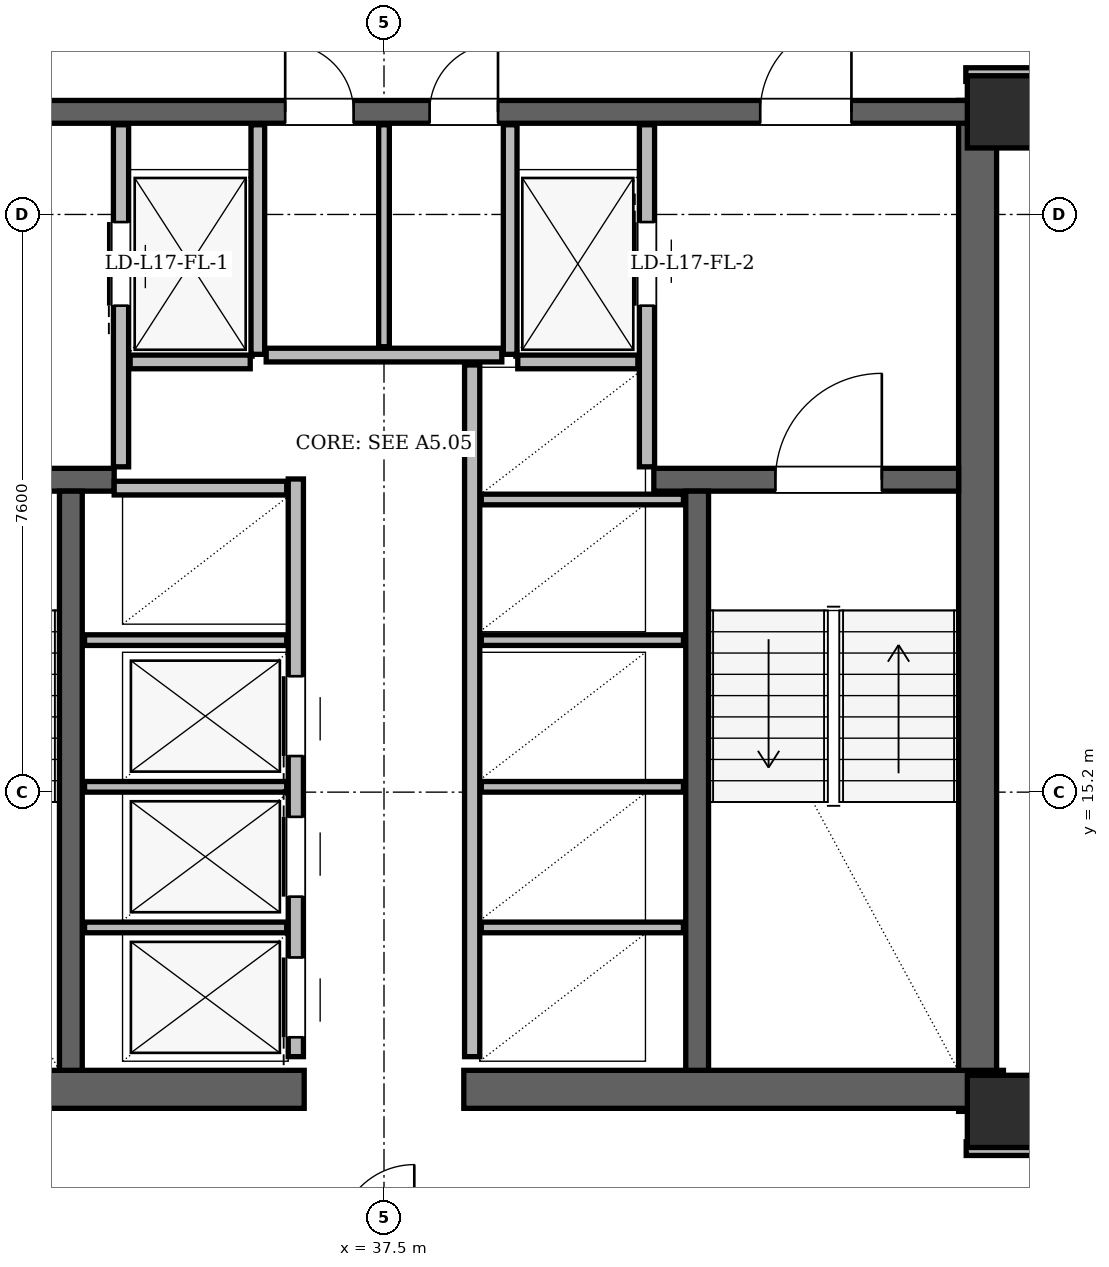
"""IFC4 building model, lengths in metres.
Left out: names, types, materials, properties, quantities, classifications, styles, units other than length and angle.
Written with IfcOpenShell. Run it as: python <this file> out.ifc"""

import sys

from ifc_helpers import new_model, si_unit, direction, frame, frame_2d, origin, origin_2d, place, context, subcontext, project, spatial, rectangle, hollow_rectangle, extrude, element, fill, save


model = new_model("IFC4")
c1 = context("Model", 3, precision=1e-05, world=origin(), true_north=direction((0.0, 1.0)))
c2 = subcontext(c1, "Body", "Model", "MODEL_VIEW")
j1 = project(units=[si_unit("LENGTHUNIT", "METRE"), si_unit("PLANEANGLEUNIT", "RADIAN")], contexts=[c1])
p1 = place(None, origin())
s1 = spatial("IfcSite", under=j1, at=p1, CompositionType="ELEMENT")
p2 = place(p1, origin())
s2 = spatial("IfcBuilding", under=s1, at=p2, CompositionType="ELEMENT")
p3 = place(p2, frame((0.0, 0.0, 66.9)))
s3 = spatial("IfcBuildingStorey", under=s2, at=p3, CompositionType="ELEMENT", Elevation=66.9)
for number, where, z_axis, x_axis in (
    (1, (45.65, 11.0, 0.0), (0.0, 0.0, 1.0), (1.0, 0.0, 0.0)),
    (2, (45.65, 24.15, 0.0), (0.0, 0.0, 1.0), (1.0, 0.0, 0.0)),
):
    element("IfcColumn", number, at=place(p3, frame(where, z_axis=z_axis, x_axis=x_axis)), inside=s3, PredefinedType="COLUMN", context=c2, shape_type="SweptSolid", body=[
        extrude(hollow_rectangle(XDim=0.95, YDim=0.95, WallThickness=0.08, at=origin_2d()), origin(), (0.0, 0.0, 1.0), 3.6),
    ])
p4 = place(p3, frame((45.31, 11.0, 0.0), z_axis=(0.0, 0.0, 1.0), x_axis=(0.0, 1.0, 0.0)))
e3 = element("IfcWall", 3, at=p4, inside=s3, PredefinedType="SHEAR", context=c2, shape_type="SweptSolid", body=[
    extrude(rectangle(XDim=13.3, YDim=0.5, at=frame_2d((6.65, 0.0))), origin(), (0.0, 0.0, 1.0), 3.36),
])
for number, where, z_axis, x_axis in (
    (4, (29.35, 11.29, 0.0), (0.0, 0.0, 1.0), (1.0, 0.0, 0.0)),
    (5, (38.55, 11.29, 0.0), (0.0, 0.0, 1.0), (1.0, 0.0, 0.0)),
):
    element("IfcWall", number, at=place(p3, frame(where, z_axis=z_axis, x_axis=x_axis)), inside=s3, PredefinedType="SHEAR", context=c2, shape_type="SweptSolid", body=[
        extrude(rectangle(XDim=7.1, YDim=0.5, at=frame_2d((3.55, 0.0))), origin(), (0.0, 0.0, 1.0), 3.36),
    ])
p5 = place(p3, frame((29.65, 24.15, 0.0), z_axis=(0.0, 0.0, 1.0), x_axis=(1.0, 0.0, 0.0)))
e6 = element("IfcWall", 6, at=p5, inside=s3, PredefinedType="SHEAR", context=c2, shape_type="SweptSolid", body=[
    extrude(rectangle(XDim=15.7, YDim=0.3, at=frame_2d((7.85, 0.0))), origin(), (0.0, 0.0, 1.0), 3.36),
])
p6 = place(p5, frame((1.7, 0.0, 0.0)))
e7 = element("IfcOpeningElement", 7, at=p6, cuts=e6, PredefinedType="OPENING", context=c2, shape_type="SweptSolid", body=[
    extrude(rectangle(XDim=1.2, YDim=2.2, at=frame_2d((0.6, 1.1))), frame((0.0, 0.15, 0.0), z_axis=(0.0, -1.0, 0.0), x_axis=(1.0, 0.0, 0.0)), (0.0, 0.0, 1.0), 0.3),
])
p7 = place(p5, frame((12.8, 0.0, 0.0)))
e8 = element("IfcOpeningElement", 8, at=p7, cuts=e6, PredefinedType="OPENING", context=c2, shape_type="SweptSolid", body=[
    extrude(rectangle(XDim=1.2, YDim=2.2, at=frame_2d((0.6, 1.1))), frame((0.0, 0.15, 0.0), z_axis=(0.0, -1.0, 0.0), x_axis=(1.0, 0.0, 0.0)), (0.0, 0.0, 1.0), 0.3),
])
p8 = place(p5, frame((6.55, 0.0, 0.0)))
e9 = element("IfcOpeningElement", 9, at=p8, cuts=e6, PredefinedType="OPENING", context=c2, shape_type="SweptSolid", body=[
    extrude(rectangle(XDim=0.9, YDim=2.05, at=frame_2d((0.45, 1.025))), frame((0.0, 0.15, 0.0), z_axis=(0.0, -1.0, 0.0), x_axis=(1.0, 0.0, 0.0)), (0.0, 0.0, 1.0), 0.3),
])
p9 = place(p5, frame((8.45, 0.0, 0.0)))
e10 = element("IfcOpeningElement", 10, at=p9, cuts=e6, PredefinedType="OPENING", context=c2, shape_type="SweptSolid", body=[
    extrude(rectangle(XDim=0.9, YDim=2.05, at=frame_2d((0.45, 1.025))), frame((0.0, 0.15, 0.0), z_axis=(0.0, -1.0, 0.0), x_axis=(1.0, 0.0, 0.0)), (0.0, 0.0, 1.0), 0.3),
])
p10 = place(p3, frame((29.94, 19.31, 0.0), z_axis=(0.0, 0.0, 1.0), x_axis=(1.0, 0.0, 0.0)))
e11 = element("IfcWall", 11, at=p10, inside=s3, PredefinedType="SHEAR", context=c2, shape_type="SweptSolid", body=[
    extrude(rectangle(XDim=4.01, YDim=0.3, at=frame_2d((2.005, 0.0))), origin(), (0.0, 0.0, 1.0), 3.36),
])
p11 = place(p10, frame((1.01, 0.0, 0.0)))
e12 = element("IfcOpeningElement", 12, at=p11, cuts=e11, PredefinedType="OPENING", context=c2, shape_type="SweptSolid", body=[
    extrude(rectangle(XDim=1.4, YDim=2.2, at=frame_2d((0.7, 1.1))), frame((0.0, 0.15, 0.0), z_axis=(0.0, -1.0, 0.0), x_axis=(1.0, 0.0, 0.0)), (0.0, 0.0, 1.0), 0.3),
])
p12 = place(p3, frame((41.05, 19.31, 0.0), z_axis=(0.0, 0.0, 1.0), x_axis=(1.0, 0.0, 0.0)))
e13 = element("IfcWall", 13, at=p12, inside=s3, PredefinedType="SHEAR", context=c2, shape_type="SweptSolid", body=[
    extrude(rectangle(XDim=4.01, YDim=0.3, at=frame_2d((2.005, 0.0))), origin(), (0.0, 0.0, 1.0), 3.36),
])
p13 = place(p12, frame((1.6, 0.0, 0.0)))
e14 = element("IfcOpeningElement", 14, at=p13, cuts=e13, PredefinedType="OPENING", context=c2, shape_type="SweptSolid", body=[
    extrude(rectangle(XDim=1.4, YDim=2.2, at=frame_2d((0.7, 1.1))), frame((0.0, 0.15, 0.0), z_axis=(0.0, -1.0, 0.0), x_axis=(1.0, 0.0, 0.0)), (0.0, 0.0, 1.0), 0.3),
])
for number, where, z_axis, x_axis in (
    (15, (33.38, 11.54, 0.0), (0.0, 0.0, 1.0), (0.0, 1.0, 0.0)),
    (16, (41.62, 11.54, 0.0), (0.0, 0.0, 1.0), (0.0, 1.0, 0.0)),
):
    element("IfcWall", number, at=place(p3, frame(where, z_axis=z_axis, x_axis=x_axis)), inside=s3, PredefinedType="SHEAR", context=c2, shape_type="SweptSolid", body=[
        extrude(rectangle(XDim=7.62, YDim=0.3, at=frame_2d((3.81, 0.0))), origin(), (0.0, 0.0, 1.0), 3.36),
    ])
p14 = place(p3, frame((61.212, 14.297, 0.0), z_axis=(0.0, 0.0, 1.0), x_axis=(-0.499997235847, 0.866026999663, 0.0)))
e17 = element("IfcWall", 17, at=p14, inside=s3, PredefinedType="SOLIDWALL", context=c2, shape_type="SweptSolid", body=[
    extrude(rectangle(XDim=33.763, YDim=0.34, at=frame_2d((16.882, 0.0))), origin(), (0.0, 0.0, 1.0), 2.494),
])
p15 = place(p14, frame((7.615, 0.0, 0.0)))
e18 = element("IfcOpeningElement", 18, at=p15, cuts=e17, PredefinedType="OPENING", context=c2, shape_type="SweptSolid", body=[
    extrude(rectangle(XDim=1.5, YDim=2.2, at=frame_2d((0.75, 1.1))), frame((0.0, 0.17, 0.0), z_axis=(0.0, -1.0, 0.0), x_axis=(1.0, 0.0, 0.0)), (0.0, 0.0, 1.0), 0.34),
])
p16 = place(p14, frame((25.894, 0.0, 0.0)))
e19 = element("IfcOpeningElement", 19, at=p16, cuts=e17, PredefinedType="OPENING", context=c2, shape_type="SweptSolid", body=[
    extrude(rectangle(XDim=1.5, YDim=2.2, at=frame_2d((0.75, 1.1))), frame((0.0, 0.17, 0.0), z_axis=(0.0, -1.0, 0.0), x_axis=(1.0, 0.0, 0.0)), (0.0, 0.0, 1.0), 0.34),
])
p17 = place(p14, frame((1.594, 0.0, 0.85)))
e20 = element("IfcOpeningElement", 20, at=p17, cuts=e17, PredefinedType="OPENING", context=c2, shape_type="SweptSolid", body=[
    extrude(rectangle(XDim=1.4, YDim=1.534, at=frame_2d((0.7, 0.767))), frame((0.0, 0.17, 0.0), z_axis=(0.0, -1.0, 0.0), x_axis=(1.0, 0.0, 0.0)), (0.0, 0.0, 1.0), 0.34),
])
p18 = place(p14, frame((20.533, 0.0, 0.85)))
e21 = element("IfcOpeningElement", 21, at=p18, cuts=e17, PredefinedType="OPENING", context=c2, shape_type="SweptSolid", body=[
    extrude(rectangle(XDim=1.2, YDim=1.48, at=frame_2d((0.6, 0.74))), frame((0.0, 0.17, 0.0), z_axis=(0.0, -1.0, 0.0), x_axis=(1.0, 0.0, 0.0)), (0.0, 0.0, 1.0), 0.34),
])
p19 = place(p14, frame((29.7, 0.0, 0.85)))
e22 = element("IfcOpeningElement", 22, at=p19, cuts=e17, PredefinedType="OPENING", context=c2, shape_type="SweptSolid", body=[
    extrude(rectangle(XDim=2.2, YDim=1.534, at=frame_2d((1.1, 0.767))), frame((0.0, 0.17, 0.0), z_axis=(0.0, -1.0, 0.0), x_axis=(1.0, 0.0, 0.0)), (0.0, 0.0, 1.0), 0.34),
])
p20 = place(p14, frame((15.112, 0.0, 0.85)))
e23 = element("IfcOpeningElement", 23, at=p20, cuts=e17, PredefinedType="OPENING", context=c2, shape_type="SweptSolid", body=[
    extrude(rectangle(XDim=1.2, YDim=1.48, at=frame_2d((0.6, 0.74))), frame((0.0, 0.17, 0.0), z_axis=(0.0, -1.0, 0.0), x_axis=(1.0, 0.0, 0.0)), (0.0, 0.0, 1.0), 0.34),
])
p21 = place(p14, frame((17.864, 0.0, 0.85)))
e24 = element("IfcOpeningElement", 24, at=p21, cuts=e17, PredefinedType="OPENING", context=c2, shape_type="SweptSolid", body=[
    extrude(rectangle(XDim=1.2, YDim=1.48, at=frame_2d((0.6, 0.74))), frame((0.0, 0.17, 0.0), z_axis=(0.0, -1.0, 0.0), x_axis=(1.0, 0.0, 0.0)), (0.0, 0.0, 1.0), 0.34),
])
p22 = place(p3, frame((34.04, 19.48, 0.0), z_axis=(0.0, 0.0, 1.0), x_axis=(0.0, 1.0, 0.0)))
e25 = element("IfcWall", 25, at=p22, inside=s3, PredefinedType="PARTITIONING", context=c2, shape_type="SweptSolid", body=[
    extrude(rectangle(XDim=4.5, YDim=0.2, at=frame_2d((2.25, 0.0))), origin(), (0.0, 0.0, 1.0), 2.4),
])
p23 = place(p22, frame((2.12, 0.0, 0.0)))
e26 = element("IfcOpeningElement", 26, at=p23, cuts=e25, PredefinedType="OPENING", context=c2, shape_type="SweptSolid", body=[
    extrude(rectangle(XDim=1.1, YDim=2.2, at=frame_2d((0.55, 1.1))), frame((0.0, 0.1, 0.0), z_axis=(0.0, -1.0, 0.0), x_axis=(1.0, 0.0, 0.0)), (0.0, 0.0, 1.0), 0.2),
])
p24 = place(p3, frame((35.84, 20.96, 0.0), z_axis=(0.0, 0.0, 1.0), x_axis=(0.0, 1.0, 0.0)))
e27 = element("IfcWall", 27, at=p24, inside=s3, PredefinedType="PARTITIONING", context=c2, shape_type="SweptSolid", body=[
    extrude(rectangle(XDim=3.02, YDim=0.18, at=frame_2d((1.51, 0.0))), origin(), (0.0, 0.0, 1.0), 2.4),
])
p25 = place(p3, frame((34.16, 20.86, 0.0), z_axis=(0.0, 0.0, 1.0), x_axis=(1.0, 0.0, 0.0)))
e28 = element("IfcWall", 28, at=p25, inside=s3, PredefinedType="PARTITIONING", context=c2, shape_type="SweptSolid", body=[
    extrude(rectangle(XDim=1.58, YDim=0.18, at=frame_2d((0.79, 0.0))), origin(), (0.0, 0.0, 1.0), 3.36),
])
p26 = place(p3, frame((40.96, 19.48, 0.0), z_axis=(0.0, 0.0, 1.0), x_axis=(0.0, 1.0, 0.0)))
e29 = element("IfcWall", 29, at=p26, inside=s3, PredefinedType="PARTITIONING", context=c2, shape_type="SweptSolid", body=[
    extrude(rectangle(XDim=4.5, YDim=0.2, at=frame_2d((2.25, 0.0))), origin(), (0.0, 0.0, 1.0), 2.4),
])
p27 = place(p26, frame((2.12, 0.0, 0.0)))
e30 = element("IfcOpeningElement", 30, at=p27, cuts=e29, PredefinedType="OPENING", context=c2, shape_type="SweptSolid", body=[
    extrude(rectangle(XDim=1.1, YDim=2.2, at=frame_2d((0.55, 1.1))), frame((0.0, 0.1, 0.0), z_axis=(0.0, -1.0, 0.0), x_axis=(1.0, 0.0, 0.0)), (0.0, 0.0, 1.0), 0.2),
])
p28 = place(p3, frame((39.16, 20.96, 0.0), z_axis=(0.0, 0.0, 1.0), x_axis=(0.0, 1.0, 0.0)))
e31 = element("IfcWall", 31, at=p28, inside=s3, PredefinedType="PARTITIONING", context=c2, shape_type="SweptSolid", body=[
    extrude(rectangle(XDim=3.02, YDim=0.18, at=frame_2d((1.51, 0.0))), origin(), (0.0, 0.0, 1.0), 2.4),
])
p29 = place(p3, frame((39.26, 20.86, 0.0), z_axis=(0.0, 0.0, 1.0), x_axis=(1.0, 0.0, 0.0)))
e32 = element("IfcWall", 32, at=p29, inside=s3, PredefinedType="PARTITIONING", context=c2, shape_type="SweptSolid", body=[
    extrude(rectangle(XDim=1.58, YDim=0.18, at=frame_2d((0.79, 0.0))), origin(), (0.0, 0.0, 1.0), 3.36),
])
p30 = place(p3, frame((36.34, 11.72, 0.0), z_axis=(0.0, 0.0, 1.0), x_axis=(0.0, 1.0, 0.0)))
e33 = element("IfcWall", 33, at=p30, inside=s3, PredefinedType="PARTITIONING", context=c2, shape_type="SweptSolid", body=[
    extrude(rectangle(XDim=7.6, YDim=0.2, at=frame_2d((3.8, 0.0))), origin(), (0.0, 0.0, 1.0), 3.36),
])
p31 = place(p30, frame((0.255, 0.0, 0.0)))
e34 = element("IfcOpeningElement", 34, at=p31, cuts=e33, PredefinedType="OPENING", context=c2, shape_type="SweptSolid", body=[
    extrude(rectangle(XDim=1.05, YDim=2.15, at=frame_2d((0.525, 1.075))), frame((0.0, 0.1, 0.0), z_axis=(0.0, -1.0, 0.0), x_axis=(1.0, 0.0, 0.0)), (0.0, 0.0, 1.0), 0.2),
])
p32 = place(p30, frame((2.105, 0.0, 0.0)))
e35 = element("IfcOpeningElement", 35, at=p32, cuts=e33, PredefinedType="OPENING", context=c2, shape_type="SweptSolid", body=[
    extrude(rectangle(XDim=1.05, YDim=2.15, at=frame_2d((0.525, 1.075))), frame((0.0, 0.1, 0.0), z_axis=(0.0, -1.0, 0.0), x_axis=(1.0, 0.0, 0.0)), (0.0, 0.0, 1.0), 0.2),
])
p33 = place(p30, frame((3.955, 0.0, 0.0)))
e36 = element("IfcOpeningElement", 36, at=p33, cuts=e33, PredefinedType="OPENING", context=c2, shape_type="SweptSolid", body=[
    extrude(rectangle(XDim=1.05, YDim=2.15, at=frame_2d((0.525, 1.075))), frame((0.0, 0.1, 0.0), z_axis=(0.0, -1.0, 0.0), x_axis=(1.0, 0.0, 0.0)), (0.0, 0.0, 1.0), 0.2),
])
p34 = place(p3, frame((33.95, 19.2, 0.0), z_axis=(0.0, 0.0, 1.0), x_axis=(1.0, 0.0, 0.0)))
e37 = element("IfcWall", 37, at=p34, inside=s3, PredefinedType="PARTITIONING", context=c2, shape_type="SweptSolid", body=[
    extrude(rectangle(XDim=2.27, YDim=0.18, at=frame_2d((1.135, 0.0))), origin(), (0.0, 0.0, 1.0), 3.36),
])
for number, where, z_axis, x_axis in (
    (38, (33.56, 13.42, 0.0), (0.0, 0.0, 1.0), (1.0, 0.0, 0.0)),
    (39, (33.56, 15.27, 0.0), (0.0, 0.0, 1.0), (1.0, 0.0, 0.0)),
    (40, (33.56, 17.2, 0.0), (0.0, 0.0, 1.0), (1.0, 0.0, 0.0)),
):
    element("IfcWall", number, at=place(p3, frame(where, z_axis=z_axis, x_axis=x_axis)), inside=s3, PredefinedType="PARTITIONING", context=c2, shape_type="SweptSolid", body=[
        extrude(rectangle(XDim=2.66, YDim=0.14, at=frame_2d((1.33, 0.0))), origin(), (0.0, 0.0, 1.0), 3.36),
    ])
p35 = place(p3, frame((38.66, 11.72, 0.0), z_axis=(0.0, 0.0, 1.0), x_axis=(0.0, 1.0, 0.0)))
e41 = element("IfcWall", 41, at=p35, inside=s3, PredefinedType="PARTITIONING", context=c2, shape_type="SweptSolid", body=[
    extrude(rectangle(XDim=9.1, YDim=0.2, at=frame_2d((4.55, 0.0))), origin(), (0.0, 0.0, 1.0), 3.36),
])
for number, where, z_axis, x_axis in (
    (42, (38.78, 13.42, 0.0), (0.0, 0.0, 1.0), (1.0, 0.0, 0.0)),
    (43, (38.78, 15.27, 0.0), (0.0, 0.0, 1.0), (1.0, 0.0, 0.0)),
    (44, (38.78, 17.2, 0.0), (0.0, 0.0, 1.0), (1.0, 0.0, 0.0)),
    (45, (38.78, 19.05, 0.0), (0.0, 0.0, 1.0), (1.0, 0.0, 0.0)),
):
    element("IfcWall", number, at=place(p3, frame(where, z_axis=z_axis, x_axis=x_axis)), inside=s3, PredefinedType="PARTITIONING", context=c2, shape_type="SweptSolid", body=[
        extrude(rectangle(XDim=2.66, YDim=0.14, at=frame_2d((1.33, 0.0))), origin(), (0.0, 0.0, 1.0), 3.36),
    ])
p36 = place(p3, frame((35.95, 20.95, 0.0), z_axis=(0.0, 0.0, 1.0), x_axis=(1.0, 0.0, 0.0)))
e46 = element("IfcWall", 46, at=p36, inside=s3, PredefinedType="PARTITIONING", context=c2, shape_type="SweptSolid", body=[
    extrude(rectangle(XDim=3.1, YDim=0.18, at=frame_2d((1.55, 0.0))), origin(), (0.0, 0.0, 1.0), 3.36),
])
p37 = place(p3, frame((37.5, 21.06, 0.0), z_axis=(0.0, 0.0, 1.0), x_axis=(0.0, 1.0, 0.0)))
e47 = element("IfcWall", 47, at=p37, inside=s3, PredefinedType="PARTITIONING", context=c2, shape_type="SweptSolid", body=[
    extrude(rectangle(XDim=2.92, YDim=0.14, at=frame_2d((1.46, 0.0))), origin(), (0.0, 0.0, 1.0), 2.4),
])
p38 = place(p3, frame((45.16, 10.51, 0.0), z_axis=(0.0, 0.0, 1.0), x_axis=(1.0, 0.0, 0.0)))
e48 = element("IfcWall", 48, at=p38, inside=s3, PredefinedType="PARTITIONING", context=c2, shape_type="SweptSolid", body=[
    extrude(rectangle(XDim=0.98, YDim=0.18, at=frame_2d((0.49, 0.0))), origin(), (0.0, 0.0, 1.0), 2.738),
])
p39 = place(p3, frame((45.155, 24.64, 0.0), z_axis=(0.0, 0.0, 1.0), x_axis=(1.0, 0.0, 0.0)))
e49 = element("IfcWall", 49, at=p39, inside=s3, PredefinedType="PARTITIONING", context=c2, shape_type="SweptSolid", body=[
    extrude(rectangle(XDim=0.99, YDim=0.18, at=frame_2d((0.495, 0.0))), origin(), (0.0, 0.0, 1.0), 2.738),
])
p40 = place(p23, origin())
e50 = element("IfcDoor", 50, at=p40, inside=s3, OperationType="SLIDING_TO_LEFT", PredefinedType="DOOR", context=c2, shape_type="SweptSolid", body=[
    extrude(rectangle(XDim=1.1, YDim=2.2, at=frame_2d((0.55, 1.1))), frame((0.0, 0.025, 0.0), z_axis=(0.0, -1.0, 0.0), x_axis=(1.0, 0.0, 0.0)), (0.0, 0.0, 1.0), 0.05),
])
fill(e26, e50)
p41 = place(p27, origin())
e51 = element("IfcDoor", 51, at=p41, inside=s3, OperationType="SLIDING_TO_RIGHT", PredefinedType="DOOR", context=c2, shape_type="SweptSolid", body=[
    extrude(rectangle(XDim=1.1, YDim=2.2, at=frame_2d((0.55, 1.1))), frame((0.0, 0.025, 0.0), z_axis=(0.0, -1.0, 0.0), x_axis=(1.0, 0.0, 0.0)), (0.0, 0.0, 1.0), 0.05),
])
fill(e30, e51)
p42 = place(p31, origin())
e52 = element("IfcDoor", 52, at=p42, inside=s3, OperationType="SLIDING_TO_LEFT", PredefinedType="DOOR", context=c2, shape_type="SweptSolid", body=[
    extrude(rectangle(XDim=1.05, YDim=2.15, at=frame_2d((0.525, 1.075))), frame((0.0, 0.025, 0.0), z_axis=(0.0, -1.0, 0.0), x_axis=(1.0, 0.0, 0.0)), (0.0, 0.0, 1.0), 0.05),
])
fill(e34, e52)
p43 = place(p32, origin())
e53 = element("IfcDoor", 53, at=p43, inside=s3, OperationType="SLIDING_TO_RIGHT", PredefinedType="DOOR", context=c2, shape_type="SweptSolid", body=[
    extrude(rectangle(XDim=1.05, YDim=2.15, at=frame_2d((0.525, 1.075))), frame((0.0, 0.025, 0.0), z_axis=(0.0, -1.0, 0.0), x_axis=(1.0, 0.0, 0.0)), (0.0, 0.0, 1.0), 0.05),
])
fill(e35, e53)
p44 = place(p33, origin())
e54 = element("IfcDoor", 54, at=p44, inside=s3, OperationType="SLIDING_TO_LEFT", PredefinedType="DOOR", context=c2, shape_type="SweptSolid", body=[
    extrude(rectangle(XDim=1.05, YDim=2.15, at=frame_2d((0.525, 1.075))), frame((0.0, 0.025, 0.0), z_axis=(0.0, -1.0, 0.0), x_axis=(1.0, 0.0, 0.0)), (0.0, 0.0, 1.0), 0.05),
])
fill(e36, e54)
p45 = place(p13, origin())
e55 = element("IfcDoor", 55, at=p45, inside=s3, OperationType="SINGLE_SWING_RIGHT", PredefinedType="DOOR", context=c2, shape_type="SweptSolid", body=[
    extrude(rectangle(XDim=1.4, YDim=2.2, at=frame_2d((0.7, 1.1))), frame((0.0, 0.025, 0.0), z_axis=(0.0, -1.0, 0.0), x_axis=(1.0, 0.0, 0.0)), (0.0, 0.0, 1.0), 0.05),
])
fill(e14, e55)
p46 = place(p7, origin())
e56 = element("IfcDoor", 56, at=p46, inside=s3, OperationType="SINGLE_SWING_RIGHT", PredefinedType="DOOR", context=c2, shape_type="SweptSolid", body=[
    extrude(rectangle(XDim=1.2, YDim=2.2, at=frame_2d((0.6, 1.1))), frame((0.0, 0.025, 0.0), z_axis=(0.0, -1.0, 0.0), x_axis=(1.0, 0.0, 0.0)), (0.0, 0.0, 1.0), 0.05),
])
fill(e8, e56)
p47 = place(p8, origin())
e57 = element("IfcDoor", 57, at=p47, inside=s3, OperationType="SINGLE_SWING_LEFT", PredefinedType="DOOR", context=c2, shape_type="SweptSolid", body=[
    extrude(rectangle(XDim=0.9, YDim=2.05, at=frame_2d((0.45, 1.025))), frame((0.0, 0.025, 0.0), z_axis=(0.0, -1.0, 0.0), x_axis=(1.0, 0.0, 0.0)), (0.0, 0.0, 1.0), 0.05),
])
fill(e9, e57)
p48 = place(p9, origin())
e58 = element("IfcDoor", 58, at=p48, inside=s3, OperationType="SINGLE_SWING_RIGHT", PredefinedType="DOOR", context=c2, shape_type="SweptSolid", body=[
    extrude(rectangle(XDim=0.9, YDim=2.05, at=frame_2d((0.45, 1.025))), frame((0.0, 0.025, 0.0), z_axis=(0.0, -1.0, 0.0), x_axis=(1.0, 0.0, 0.0)), (0.0, 0.0, 1.0), 0.05),
])
fill(e10, e58)
save(model, sys.argv[1])
